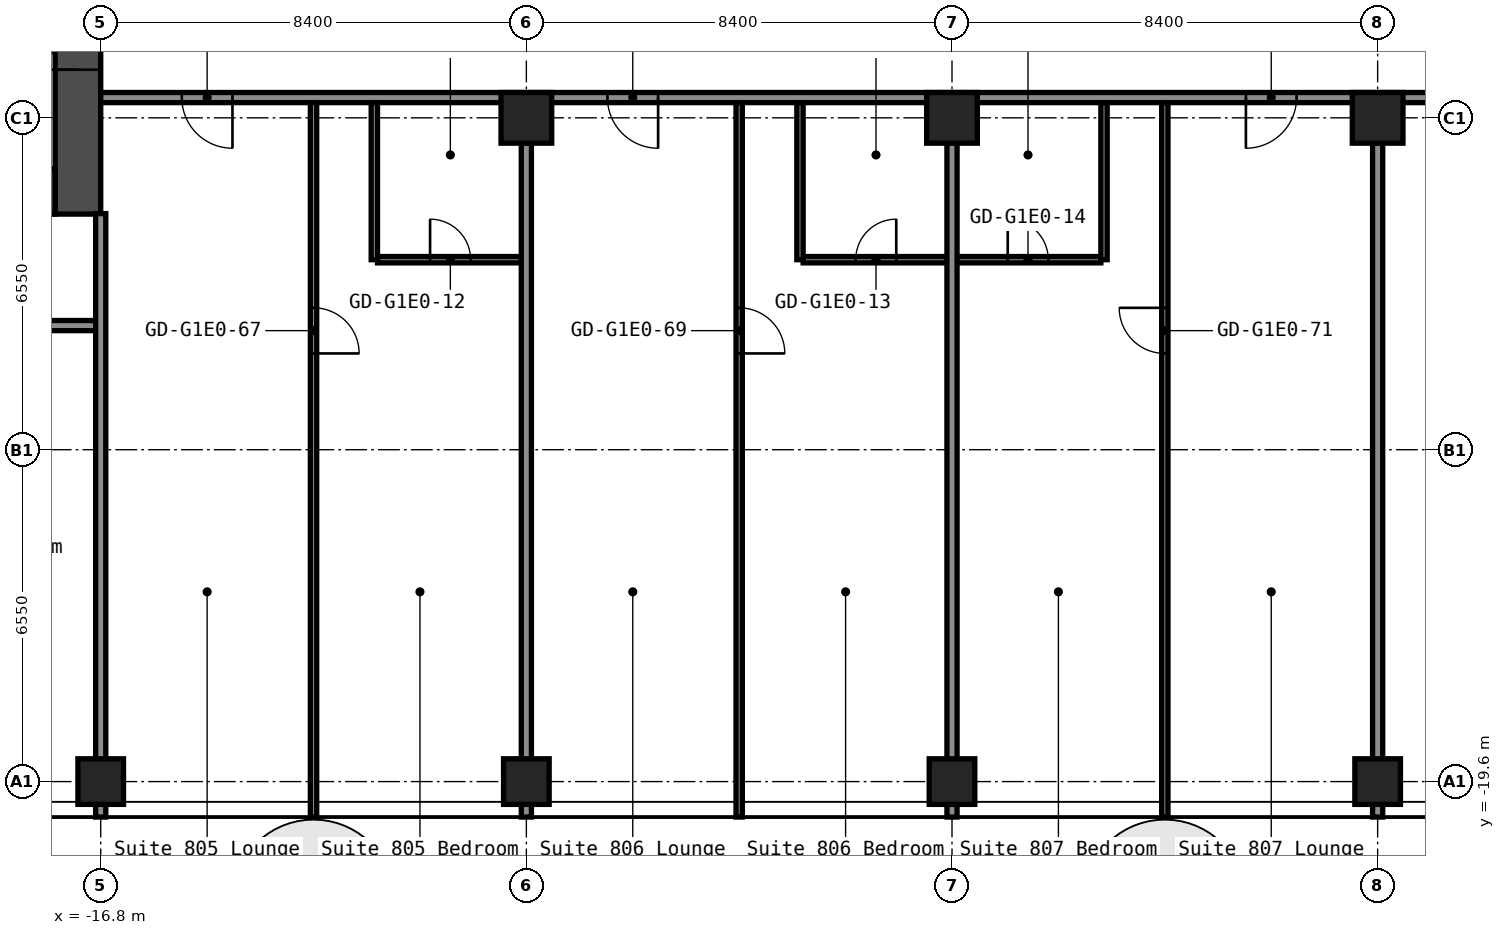
"""IFC4 building model, lengths in metres.
Left out: names, types, materials, properties, quantities, classifications, styles, units other than length and angle.
Written with IfcOpenShell. Run it as: python <this file> out.ifc"""

import sys

from ifc_helpers import new_model, si_unit, direction, frame, frame_2d, origin, origin_2d, place, context, subcontext, project, spatial, rectangle, hollow_rectangle, extrude, element, fill, save


model = new_model("IFC4")
c1 = context("Model", 3, precision=1e-05, world=origin(), true_north=direction((0.0, 1.0)))
c2 = subcontext(c1, "Body", "Model", "MODEL_VIEW")
j1 = project(units=[si_unit("LENGTHUNIT", "METRE"), si_unit("PLANEANGLEUNIT", "RADIAN")], contexts=[c1])
p1 = place(None, origin())
s1 = spatial("IfcSite", under=j1, at=p1, CompositionType="ELEMENT")
p2 = place(p1, origin())
s2 = spatial("IfcBuilding", under=s1, at=p2, CompositionType="ELEMENT")
p3 = place(p2, frame((0.0, 0.0, 32.6)))
s3 = spatial("IfcBuildingStorey", under=s2, at=p3, CompositionType="ELEMENT", Elevation=32.6)
for number, where, z_axis, x_axis in (
    (1, (-16.8, -19.6, 0.0), (0.0, 0.0, 1.0), (1.0, 0.0, 0.0)),
    (2, (-8.4, -19.6, 0.0), (0.0, 0.0, 1.0), (1.0, 0.0, 0.0)),
):
    element("IfcColumn", number, at=place(p3, frame(where, z_axis=z_axis, x_axis=x_axis)), inside=s3, PredefinedType="COLUMN", context=c2, shape_type="SweptSolid", body=[
        extrude(hollow_rectangle(XDim=0.9, YDim=0.9, WallThickness=0.036, at=origin_2d()), origin(), (0.0, 0.0, 1.0), 2.8),
    ])
p4 = place(p3, frame((-8.4, -6.5, 0.0), z_axis=(0.0, 0.0, 1.0), x_axis=(1.0, 0.0, 0.0)))
e3 = element("IfcColumn", 3, at=p4, inside=s3, PredefinedType="COLUMN", context=c2, shape_type="SweptSolid", body=[
    extrude(hollow_rectangle(XDim=1.0, YDim=1.0, WallThickness=0.04, at=origin_2d()), origin(), (0.0, 0.0, 1.0), 2.8),
])
p5 = place(p3, frame((0.0, -19.6, 0.0), z_axis=(0.0, 0.0, 1.0), x_axis=(1.0, 0.0, 0.0)))
e4 = element("IfcColumn", 4, at=p5, inside=s3, PredefinedType="COLUMN", context=c2, shape_type="SweptSolid", body=[
    extrude(hollow_rectangle(XDim=0.9, YDim=0.9, WallThickness=0.036, at=origin_2d()), origin(), (0.0, 0.0, 1.0), 2.8),
])
p6 = place(p3, frame((0.0, -6.5, 0.0), z_axis=(0.0, 0.0, 1.0), x_axis=(1.0, 0.0, 0.0)))
e5 = element("IfcColumn", 5, at=p6, inside=s3, PredefinedType="COLUMN", context=c2, shape_type="SweptSolid", body=[
    extrude(hollow_rectangle(XDim=1.0, YDim=1.0, WallThickness=0.04, at=origin_2d()), origin(), (0.0, 0.0, 1.0), 2.8),
])
p7 = place(p3, frame((8.4, -19.6, 0.0), z_axis=(0.0, 0.0, 1.0), x_axis=(1.0, 0.0, 0.0)))
e6 = element("IfcColumn", 6, at=p7, inside=s3, PredefinedType="COLUMN", context=c2, shape_type="SweptSolid", body=[
    extrude(hollow_rectangle(XDim=0.9, YDim=0.9, WallThickness=0.036, at=origin_2d()), origin(), (0.0, 0.0, 1.0), 2.8),
])
p8 = place(p3, frame((8.4, -6.5, 0.0), z_axis=(0.0, 0.0, 1.0), x_axis=(1.0, 0.0, 0.0)))
e7 = element("IfcColumn", 7, at=p8, inside=s3, PredefinedType="COLUMN", context=c2, shape_type="SweptSolid", body=[
    extrude(hollow_rectangle(XDim=1.0, YDim=1.0, WallThickness=0.04, at=origin_2d()), origin(), (0.0, 0.0, 1.0), 2.8),
])
p9 = place(p3, frame((-17.25, -8.4, 0.0), z_axis=(0.0, 0.0, 1.0), x_axis=(0.0, 1.0, 0.0)))
e8 = element("IfcWall", 8, at=p9, inside=s3, PredefinedType="SHEAR", context=c2, shape_type="SweptSolid", body=[
    extrude(rectangle(XDim=16.8, YDim=0.9, at=frame_2d((8.4, 0.0))), origin(), (0.0, 0.0, 1.0), 2.8),
])
p10 = place(p9, frame((12.75, 0.0, 0.0)))
e9 = element("IfcOpeningElement", 9, at=p10, cuts=e8, PredefinedType="OPENING", context=c2, shape_type="SweptSolid", body=[
    extrude(rectangle(XDim=1.2, YDim=2.1, at=frame_2d((0.6, 1.05))), frame((0.0, 0.46, 0.0), z_axis=(0.0, -1.0, 0.0), x_axis=(1.0, 0.0, 0.0)), (0.0, 0.0, 1.0), 0.92),
])
p11 = place(p9, frame((2.85, 0.0, 0.0)))
e10 = element("IfcOpeningElement", 10, at=p11, cuts=e8, PredefinedType="OPENING", context=c2, shape_type="SweptSolid", body=[
    extrude(rectangle(XDim=1.2, YDim=2.1, at=frame_2d((0.6, 1.05))), frame((0.0, 0.46, 0.0), z_axis=(0.0, -1.0, 0.0), x_axis=(1.0, 0.0, 0.0)), (0.0, 0.0, 1.0), 0.92),
])
p12 = place(p3, frame((-32.7, -7.95, 0.0), z_axis=(0.0, 0.0, 1.0), x_axis=(1.0, 0.0, 0.0)))
e11 = element("IfcWall", 11, at=p12, inside=s3, PredefinedType="SHEAR", context=c2, shape_type="SweptSolid", body=[
    extrude(rectangle(XDim=15.0, YDim=0.9, at=frame_2d((7.5, 0.0))), origin(), (0.0, 0.0, 1.0), 2.8),
])
p13 = place(p12, frame((11.45, 0.0, 0.0)))
e12 = element("IfcOpeningElement", 12, at=p13, cuts=e11, PredefinedType="OPENING", context=c2, shape_type="SweptSolid", body=[
    extrude(rectangle(XDim=1.0, YDim=2.1, at=frame_2d((0.5, 1.05))), frame((0.0, 0.46, 0.0), z_axis=(0.0, -1.0, 0.0), x_axis=(1.0, 0.0, 0.0)), (0.0, 0.0, 1.0), 0.92),
])
p14 = place(p3, frame((-51.1, -10.6, 0.0), z_axis=(0.0, 0.0, 1.0), x_axis=(1.0, 0.0, 0.0)))
e13 = element("IfcWall", 13, at=p14, inside=s3, PredefinedType="PARTITIONING", context=c2, shape_type="SweptSolid", body=[
    extrude(rectangle(XDim=34.3, YDim=0.2, at=frame_2d((17.15, 0.0))), origin(), (0.0, 0.0, 1.0), 2.8),
])
p15 = place(p14, frame((1.61, 0.0, 0.0)))
e14 = element("IfcOpeningElement", 14, at=p15, cuts=e13, PredefinedType="OPENING", context=c2, shape_type="SweptSolid", body=[
    extrude(rectangle(XDim=0.9, YDim=2.1, at=frame_2d((0.45, 1.05))), frame((0.0, 0.11, 0.0), z_axis=(0.0, -1.0, 0.0), x_axis=(1.0, 0.0, 0.0)), (0.0, 0.0, 1.0), 0.22),
])
p16 = place(p14, frame((6.01, 0.0, 0.0)))
e15 = element("IfcOpeningElement", 15, at=p16, cuts=e13, PredefinedType="OPENING", context=c2, shape_type="SweptSolid", body=[
    extrude(rectangle(XDim=0.9, YDim=2.1, at=frame_2d((0.45, 1.05))), frame((0.0, 0.11, 0.0), z_axis=(0.0, -1.0, 0.0), x_axis=(1.0, 0.0, 0.0)), (0.0, 0.0, 1.0), 0.22),
])
p17 = place(p14, frame((11.085, 0.0, 0.0)))
e16 = element("IfcOpeningElement", 16, at=p17, cuts=e13, PredefinedType="OPENING", context=c2, shape_type="SweptSolid", body=[
    extrude(rectangle(XDim=0.9, YDim=2.1, at=frame_2d((0.45, 1.05))), frame((0.0, 0.11, 0.0), z_axis=(0.0, -1.0, 0.0), x_axis=(1.0, 0.0, 0.0)), (0.0, 0.0, 1.0), 0.22),
])
p18 = place(p14, frame((15.285, 0.0, 0.0)))
e17 = element("IfcOpeningElement", 17, at=p18, cuts=e13, PredefinedType="OPENING", context=c2, shape_type="SweptSolid", body=[
    extrude(rectangle(XDim=0.9, YDim=2.1, at=frame_2d((0.45, 1.05))), frame((0.0, 0.11, 0.0), z_axis=(0.0, -1.0, 0.0), x_axis=(1.0, 0.0, 0.0)), (0.0, 0.0, 1.0), 0.22),
])
p19 = place(p14, frame((21.2, 0.0, 0.0)))
e18 = element("IfcOpeningElement", 18, at=p19, cuts=e13, PredefinedType="OPENING", context=c2, shape_type="SweptSolid", body=[
    extrude(rectangle(XDim=1.0, YDim=2.1, at=frame_2d((0.5, 1.05))), frame((0.0, 0.11, 0.0), z_axis=(0.0, -1.0, 0.0), x_axis=(1.0, 0.0, 0.0)), (0.0, 0.0, 1.0), 0.22),
])
p20 = place(p14, frame((26.96, 0.0, 0.0)))
e19 = element("IfcOpeningElement", 19, at=p20, cuts=e13, PredefinedType="OPENING", context=c2, shape_type="SweptSolid", body=[
    extrude(rectangle(XDim=0.9, YDim=2.1, at=frame_2d((0.45, 1.05))), frame((0.0, 0.11, 0.0), z_axis=(0.0, -1.0, 0.0), x_axis=(1.0, 0.0, 0.0)), (0.0, 0.0, 1.0), 0.22),
])
p21 = place(p14, frame((31.16, 0.0, 0.0)))
e20 = element("IfcOpeningElement", 20, at=p21, cuts=e13, PredefinedType="OPENING", context=c2, shape_type="SweptSolid", body=[
    extrude(rectangle(XDim=0.9, YDim=2.1, at=frame_2d((0.45, 1.05))), frame((0.0, 0.11, 0.0), z_axis=(0.0, -1.0, 0.0), x_axis=(1.0, 0.0, 0.0)), (0.0, 0.0, 1.0), 0.22),
])
p22 = place(p3, frame((-11.337, -9.3, 0.0), z_axis=(0.0, 0.0, 1.0), x_axis=(1.0, 0.0, 0.0)))
e21 = element("IfcWall", 21, at=p22, inside=s3, PredefinedType="PARTITIONING", context=c2, shape_type="SweptSolid", body=[
    extrude(rectangle(XDim=2.837, YDim=0.125, at=frame_2d((1.419, 0.0))), origin(), (0.0, 0.0, 1.0), 2.8),
])
p23 = place(p22, frame((1.038, 0.0, 0.0)))
e22 = element("IfcOpeningElement", 22, at=p23, cuts=e21, PredefinedType="OPENING", context=c2, shape_type="SweptSolid", body=[
    extrude(rectangle(XDim=0.8, YDim=2.1, at=frame_2d((0.4, 1.05))), frame((0.0, 0.073, 0.0), z_axis=(0.0, -1.0, 0.0), x_axis=(1.0, 0.0, 0.0)), (0.0, 0.0, 1.0), 0.145),
])
p24 = place(p3, frame((-2.938, -9.3, 0.0), z_axis=(0.0, 0.0, 1.0), x_axis=(1.0, 0.0, 0.0)))
e23 = element("IfcWall", 23, at=p24, inside=s3, PredefinedType="PARTITIONING", context=c2, shape_type="SweptSolid", body=[
    extrude(rectangle(XDim=5.875, YDim=0.125, at=frame_2d((2.938, 0.0))), origin(), (0.0, 0.0, 1.0), 2.8),
])
p25 = place(p24, frame((1.038, 0.0, 0.0)))
e24 = element("IfcOpeningElement", 24, at=p25, cuts=e23, PredefinedType="OPENING", context=c2, shape_type="SweptSolid", body=[
    extrude(rectangle(XDim=0.8, YDim=2.1, at=frame_2d((0.4, 1.05))), frame((0.0, 0.073, 0.0), z_axis=(0.0, -1.0, 0.0), x_axis=(1.0, 0.0, 0.0)), (0.0, 0.0, 1.0), 0.145),
])
p26 = place(p24, frame((4.038, 0.0, 0.0)))
e25 = element("IfcOpeningElement", 25, at=p26, cuts=e23, PredefinedType="OPENING", context=c2, shape_type="SweptSolid", body=[
    extrude(rectangle(XDim=0.8, YDim=2.1, at=frame_2d((0.4, 1.05))), frame((0.0, 0.073, 0.0), z_axis=(0.0, -1.0, 0.0), x_axis=(1.0, 0.0, 0.0)), (0.0, 0.0, 1.0), 0.145),
])
p27 = place(p3, frame((-16.8, -6.1, 0.0), z_axis=(0.0, 0.0, 1.0), x_axis=(1.0, 0.0, 0.0)))
e26 = element("IfcWall", 26, at=p27, inside=s3, PredefinedType="PARTITIONING", context=c2, shape_type="SweptSolid", body=[
    extrude(rectangle(XDim=33.6, YDim=0.2, at=frame_2d((16.8, 0.0))), origin(), (0.0, 0.0, 1.0), 2.8),
])
p28 = place(p27, frame((1.6, 0.0, 0.0)))
e27 = element("IfcOpeningElement", 27, at=p28, cuts=e26, PredefinedType="OPENING", context=c2, shape_type="SweptSolid", body=[
    extrude(rectangle(XDim=1.0, YDim=2.1, at=frame_2d((0.5, 1.05))), frame((0.0, 0.11, 0.0), z_axis=(0.0, -1.0, 0.0), x_axis=(1.0, 0.0, 0.0)), (0.0, 0.0, 1.0), 0.22),
])
p29 = place(p27, frame((10.0, 0.0, 0.0)))
e28 = element("IfcOpeningElement", 28, at=p29, cuts=e26, PredefinedType="OPENING", context=c2, shape_type="SweptSolid", body=[
    extrude(rectangle(XDim=1.0, YDim=2.1, at=frame_2d((0.5, 1.05))), frame((0.0, 0.11, 0.0), z_axis=(0.0, -1.0, 0.0), x_axis=(1.0, 0.0, 0.0)), (0.0, 0.0, 1.0), 0.22),
])
p30 = place(p27, frame((22.6, 0.0, 0.0)))
e29 = element("IfcOpeningElement", 29, at=p30, cuts=e26, PredefinedType="OPENING", context=c2, shape_type="SweptSolid", body=[
    extrude(rectangle(XDim=1.0, YDim=2.1, at=frame_2d((0.5, 1.05))), frame((0.0, 0.11, 0.0), z_axis=(0.0, -1.0, 0.0), x_axis=(1.0, 0.0, 0.0)), (0.0, 0.0, 1.0), 0.22),
])
p31 = place(p27, frame((27.1, 0.0, 0.0)))
e30 = element("IfcOpeningElement", 30, at=p31, cuts=e26, PredefinedType="OPENING", context=c2, shape_type="SweptSolid", body=[
    extrude(rectangle(XDim=1.0, YDim=2.1, at=frame_2d((0.5, 1.05))), frame((0.0, 0.11, 0.0), z_axis=(0.0, -1.0, 0.0), x_axis=(1.0, 0.0, 0.0)), (0.0, 0.0, 1.0), 0.22),
])
p32 = place(p3, frame((-16.8, -20.3, 0.0), z_axis=(0.0, 0.0, 1.0), x_axis=(0.0, 1.0, 0.0)))
e31 = element("IfcWall", 31, at=p32, inside=s3, PredefinedType="PARTITIONING", context=c2, shape_type="SweptSolid", body=[
    extrude(rectangle(XDim=11.91, YDim=0.2, at=frame_2d((5.955, 0.0))), origin(), (0.0, 0.0, 1.0), 2.8),
])
p33 = place(p3, frame((-12.6, -20.3, 0.0), z_axis=(0.0, 0.0, 1.0), x_axis=(0.0, 1.0, 0.0)))
e32 = element("IfcWall", 32, at=p33, inside=s3, PredefinedType="PARTITIONING", context=c2, shape_type="SweptSolid", body=[
    extrude(rectangle(XDim=14.1, YDim=0.125, at=frame_2d((7.05, 0.0))), origin(), (0.0, 0.0, 1.0), 2.8),
])
p34 = place(p33, frame((9.15, 0.0, 0.0)))
e33 = element("IfcOpeningElement", 33, at=p34, cuts=e32, PredefinedType="OPENING", context=c2, shape_type="SweptSolid", body=[
    extrude(rectangle(XDim=0.9, YDim=2.1, at=frame_2d((0.45, 1.05))), frame((0.0, 0.073, 0.0), z_axis=(0.0, -1.0, 0.0), x_axis=(1.0, 0.0, 0.0)), (0.0, 0.0, 1.0), 0.145),
])
p35 = place(p3, frame((-11.4, -9.3, 0.0), z_axis=(0.0, 0.0, 1.0), x_axis=(0.0, 1.0, 0.0)))
e34 = element("IfcWall", 34, at=p35, inside=s3, PredefinedType="PARTITIONING", context=c2, shape_type="SweptSolid", body=[
    extrude(rectangle(XDim=3.1, YDim=0.125, at=frame_2d((1.55, 0.0))), origin(), (0.0, 0.0, 1.0), 2.8),
])
p36 = place(p3, frame((-8.4, -20.3, 0.0), z_axis=(0.0, 0.0, 1.0), x_axis=(0.0, 1.0, 0.0)))
e35 = element("IfcWall", 35, at=p36, inside=s3, PredefinedType="PARTITIONING", context=c2, shape_type="SweptSolid", body=[
    extrude(rectangle(XDim=13.31, YDim=0.2, at=frame_2d((6.655, 0.0))), origin(), (0.0, 0.0, 1.0), 2.8),
])
p37 = place(p3, frame((-4.2, -20.3, 0.0), z_axis=(0.0, 0.0, 1.0), x_axis=(0.0, 1.0, 0.0)))
e36 = element("IfcWall", 36, at=p37, inside=s3, PredefinedType="PARTITIONING", context=c2, shape_type="SweptSolid", body=[
    extrude(rectangle(XDim=14.1, YDim=0.125, at=frame_2d((7.05, 0.0))), origin(), (0.0, 0.0, 1.0), 2.8),
])
p38 = place(p37, frame((9.15, 0.0, 0.0)))
e37 = element("IfcOpeningElement", 37, at=p38, cuts=e36, PredefinedType="OPENING", context=c2, shape_type="SweptSolid", body=[
    extrude(rectangle(XDim=0.9, YDim=2.1, at=frame_2d((0.45, 1.05))), frame((0.0, 0.073, 0.0), z_axis=(0.0, -1.0, 0.0), x_axis=(1.0, 0.0, 0.0)), (0.0, 0.0, 1.0), 0.145),
])
p39 = place(p3, frame((-3.0, -9.3, 0.0), z_axis=(0.0, 0.0, 1.0), x_axis=(0.0, 1.0, 0.0)))
e38 = element("IfcWall", 38, at=p39, inside=s3, PredefinedType="PARTITIONING", context=c2, shape_type="SweptSolid", body=[
    extrude(rectangle(XDim=3.1, YDim=0.125, at=frame_2d((1.55, 0.0))), origin(), (0.0, 0.0, 1.0), 2.8),
])
p40 = place(p3, frame((0.0, -20.3, 0.0), z_axis=(0.0, 0.0, 1.0), x_axis=(0.0, 1.0, 0.0)))
e39 = element("IfcWall", 39, at=p40, inside=s3, PredefinedType="PARTITIONING", context=c2, shape_type="SweptSolid", body=[
    extrude(rectangle(XDim=13.31, YDim=0.2, at=frame_2d((6.655, 0.0))), origin(), (0.0, 0.0, 1.0), 2.8),
])
p41 = place(p3, frame((3.0, -9.3, 0.0), z_axis=(0.0, 0.0, 1.0), x_axis=(0.0, 1.0, 0.0)))
e40 = element("IfcWall", 40, at=p41, inside=s3, PredefinedType="PARTITIONING", context=c2, shape_type="SweptSolid", body=[
    extrude(rectangle(XDim=3.1, YDim=0.125, at=frame_2d((1.55, 0.0))), origin(), (0.0, 0.0, 1.0), 2.8),
])
p42 = place(p3, frame((4.2, -20.3, 0.0), z_axis=(0.0, 0.0, 1.0), x_axis=(0.0, 1.0, 0.0)))
e41 = element("IfcWall", 41, at=p42, inside=s3, PredefinedType="PARTITIONING", context=c2, shape_type="SweptSolid", body=[
    extrude(rectangle(XDim=14.1, YDim=0.125, at=frame_2d((7.05, 0.0))), origin(), (0.0, 0.0, 1.0), 2.8),
])
p43 = place(p42, frame((9.15, 0.0, 0.0)))
e42 = element("IfcOpeningElement", 42, at=p43, cuts=e41, PredefinedType="OPENING", context=c2, shape_type="SweptSolid", body=[
    extrude(rectangle(XDim=0.9, YDim=2.1, at=frame_2d((0.45, 1.05))), frame((0.0, 0.073, 0.0), z_axis=(0.0, -1.0, 0.0), x_axis=(1.0, 0.0, 0.0)), (0.0, 0.0, 1.0), 0.145),
])
p44 = place(p3, frame((8.4, -20.3, 0.0), z_axis=(0.0, 0.0, 1.0), x_axis=(0.0, 1.0, 0.0)))
e43 = element("IfcWall", 43, at=p44, inside=s3, PredefinedType="PARTITIONING", context=c2, shape_type="SweptSolid", body=[
    extrude(rectangle(XDim=13.31, YDim=0.2, at=frame_2d((6.655, 0.0))), origin(), (0.0, 0.0, 1.0), 2.8),
])
p45 = place(p11, origin())
e44 = element("IfcDoor", 44, at=p45, inside=s3, OperationType="DOUBLE_DOOR_SINGLE_SWING", PredefinedType="DOOR", context=c2, shape_type="SweptSolid", body=[
    extrude(rectangle(XDim=1.2, YDim=2.1, at=frame_2d((0.6, 1.05))), frame((0.0, 0.025, 0.0), z_axis=(0.0, -1.0, 0.0), x_axis=(1.0, 0.0, 0.0)), (0.0, 0.0, 1.0), 0.05),
])
fill(e10, e44)
p46 = place(p23, origin())
e45 = element("IfcDoor", 45, at=p46, inside=s3, OperationType="SINGLE_SWING_RIGHT", PredefinedType="DOOR", context=c2, shape_type="SweptSolid", body=[
    extrude(rectangle(XDim=0.8, YDim=2.1, at=frame_2d((0.4, 1.05))), frame((0.0, 0.025, 0.0), z_axis=(0.0, -1.0, 0.0), x_axis=(1.0, 0.0, 0.0)), (0.0, 0.0, 1.0), 0.05),
])
fill(e22, e45)
p47 = place(p25, origin())
e46 = element("IfcDoor", 46, at=p47, inside=s3, OperationType="SINGLE_SWING_LEFT", PredefinedType="DOOR", context=c2, shape_type="SweptSolid", body=[
    extrude(rectangle(XDim=0.8, YDim=2.1, at=frame_2d((0.4, 1.05))), frame((0.0, 0.025, 0.0), z_axis=(0.0, -1.0, 0.0), x_axis=(1.0, 0.0, 0.0)), (0.0, 0.0, 1.0), 0.05),
])
fill(e24, e46)
p48 = place(p26, origin())
e47 = element("IfcDoor", 47, at=p48, inside=s3, OperationType="SINGLE_SWING_RIGHT", PredefinedType="DOOR", context=c2, shape_type="SweptSolid", body=[
    extrude(rectangle(XDim=0.8, YDim=2.1, at=frame_2d((0.4, 1.05))), frame((0.0, 0.025, 0.0), z_axis=(0.0, -1.0, 0.0), x_axis=(1.0, 0.0, 0.0)), (0.0, 0.0, 1.0), 0.05),
])
fill(e25, e47)
p49 = place(p28, origin())
e48 = element("IfcDoor", 48, at=p49, inside=s3, OperationType="SINGLE_SWING_RIGHT", PredefinedType="DOOR", context=c2, shape_type="SweptSolid", body=[
    extrude(rectangle(XDim=1.0, YDim=2.1, at=frame_2d((0.5, 1.05))), frame((0.0, 0.025, 0.0), z_axis=(0.0, -1.0, 0.0), x_axis=(1.0, 0.0, 0.0)), (0.0, 0.0, 1.0), 0.05),
])
fill(e27, e48)
p50 = place(p29, origin())
e49 = element("IfcDoor", 49, at=p50, inside=s3, OperationType="SINGLE_SWING_RIGHT", PredefinedType="DOOR", context=c2, shape_type="SweptSolid", body=[
    extrude(rectangle(XDim=1.0, YDim=2.1, at=frame_2d((0.5, 1.05))), frame((0.0, 0.025, 0.0), z_axis=(0.0, -1.0, 0.0), x_axis=(1.0, 0.0, 0.0)), (0.0, 0.0, 1.0), 0.05),
])
fill(e28, e49)
p51 = place(p30, origin())
e50 = element("IfcDoor", 50, at=p51, inside=s3, OperationType="SINGLE_SWING_LEFT", PredefinedType="DOOR", context=c2, shape_type="SweptSolid", body=[
    extrude(rectangle(XDim=1.0, YDim=2.1, at=frame_2d((0.5, 1.05))), frame((0.0, 0.025, 0.0), z_axis=(0.0, -1.0, 0.0), x_axis=(1.0, 0.0, 0.0)), (0.0, 0.0, 1.0), 0.05),
])
fill(e29, e50)
p52 = place(p34, origin())
e51 = element("IfcDoor", 51, at=p52, inside=s3, OperationType="SINGLE_SWING_LEFT", PredefinedType="DOOR", context=c2, shape_type="SweptSolid", body=[
    extrude(rectangle(XDim=0.9, YDim=2.1, at=frame_2d((0.45, 1.05))), frame((0.0, 0.025, 0.0), z_axis=(0.0, -1.0, 0.0), x_axis=(1.0, 0.0, 0.0)), (0.0, 0.0, 1.0), 0.05),
])
fill(e33, e51)
p53 = place(p38, origin())
e52 = element("IfcDoor", 52, at=p53, inside=s3, OperationType="SINGLE_SWING_LEFT", PredefinedType="DOOR", context=c2, shape_type="SweptSolid", body=[
    extrude(rectangle(XDim=0.9, YDim=2.1, at=frame_2d((0.45, 1.05))), frame((0.0, 0.025, 0.0), z_axis=(0.0, -1.0, 0.0), x_axis=(1.0, 0.0, 0.0)), (0.0, 0.0, 1.0), 0.05),
])
fill(e37, e52)
p54 = place(p43, origin())
e53 = element("IfcDoor", 53, at=p54, inside=s3, OperationType="SINGLE_SWING_LEFT", PredefinedType="DOOR", context=c2, shape_type="SweptSolid", body=[
    extrude(rectangle(XDim=0.9, YDim=2.1, at=frame_2d((0.45, 1.05))), frame((0.0, 0.025, 0.0), z_axis=(0.0, -1.0, 0.0), x_axis=(1.0, 0.0, 0.0)), (0.0, 0.0, 1.0), 0.05),
])
fill(e42, e53)
save(model, sys.argv[1])
